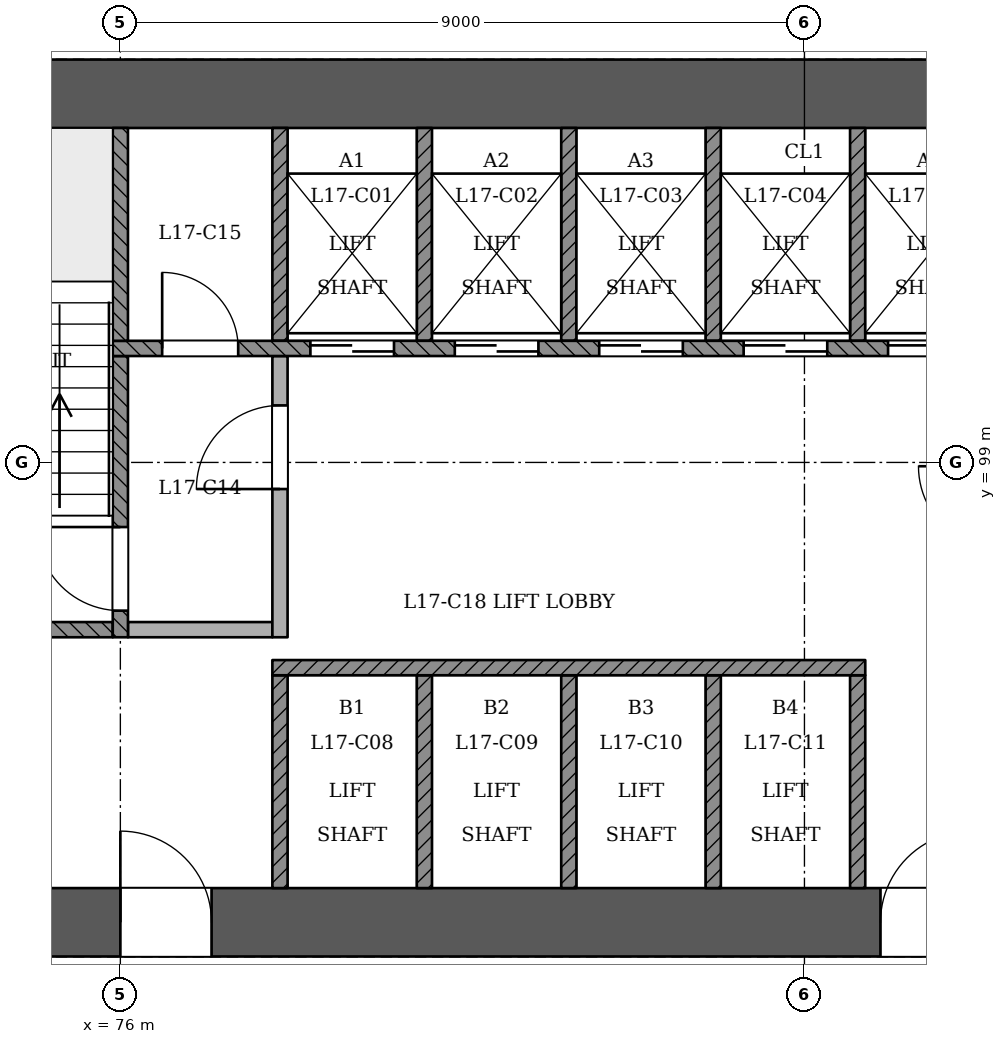
"""IFC4 building model, lengths in metres.
Left out: names, types, materials, properties, quantities, classifications, styles, units other than length and angle.
Written with IfcOpenShell. Run it as: python <this file> out.ifc"""

import sys

from ifc_helpers import new_model, si_unit, direction, frame, frame_2d, origin, place, context, subcontext, project, spatial, rectangle, extrude, element, fill, save


model = new_model("IFC4")
c1 = context("Model", 3, precision=1e-05, world=origin(), true_north=direction((0.0, 1.0)))
c2 = subcontext(c1, "Body", "Model", "MODEL_VIEW")
j1 = project(units=[si_unit("LENGTHUNIT", "METRE"), si_unit("PLANEANGLEUNIT", "RADIAN")], contexts=[c1])
p1 = place(None, origin())
s1 = spatial("IfcSite", under=j1, at=p1, CompositionType="ELEMENT")
p2 = place(p1, origin())
s2 = spatial("IfcBuilding", under=s1, at=p2, CompositionType="ELEMENT")
p3 = place(p2, frame((0.0, 0.0, 70.2)))
s3 = spatial("IfcBuildingStorey", under=s2, at=p3, CompositionType="ELEMENT", Elevation=70.2)
p4 = place(p3, frame((72.55, 92.95, 0.0), z_axis=(0.0, 0.0, 1.0), x_axis=(1.0, 0.0, 0.0)))
e1 = element("IfcWall", 1, at=p4, inside=s3, PredefinedType="SHEAR", context=c2, shape_type="SweptSolid", body=[
    extrude(rectangle(XDim=25.35, YDim=0.9, at=frame_2d((12.675, 0.0))), origin(), (0.0, 0.0, 1.0), 3.6),
])
p5 = place(p4, frame((1.25, 0.0, 0.0)))
e2 = element("IfcOpeningElement", 2, at=p5, cuts=e1, PredefinedType="OPENING", context=c2, shape_type="SweptSolid", body=[
    extrude(rectangle(XDim=1.2, YDim=2.1, at=frame_2d((0.6, 1.05))), frame((0.0, 0.46, 0.0), z_axis=(0.0, -1.0, 0.0), x_axis=(1.0, 0.0, 0.0)), (0.0, 0.0, 1.0), 0.921),
])
p6 = place(p4, frame((3.45, 0.0, 0.0)))
e3 = element("IfcOpeningElement", 3, at=p6, cuts=e1, PredefinedType="OPENING", context=c2, shape_type="SweptSolid", body=[
    extrude(rectangle(XDim=1.2, YDim=2.1, at=frame_2d((0.6, 1.05))), frame((0.0, 0.46, 0.0), z_axis=(0.0, -1.0, 0.0), x_axis=(1.0, 0.0, 0.0)), (0.0, 0.0, 1.0), 0.921),
])
p7 = place(p4, frame((13.45, 0.0, 0.0)))
e4 = element("IfcOpeningElement", 4, at=p7, cuts=e1, PredefinedType="OPENING", context=c2, shape_type="SweptSolid", body=[
    extrude(rectangle(XDim=1.2, YDim=2.1, at=frame_2d((0.6, 1.05))), frame((0.0, 0.46, 0.0), z_axis=(0.0, -1.0, 0.0), x_axis=(1.0, 0.0, 0.0)), (0.0, 0.0, 1.0), 0.921),
])
p8 = place(p4, frame((16.312, 0.0, 0.0)))
e5 = element("IfcOpeningElement", 5, at=p8, cuts=e1, PredefinedType="OPENING", context=c2, shape_type="SweptSolid", body=[
    extrude(rectangle(XDim=1.0, YDim=2.1, at=frame_2d((0.5, 1.05))), frame((0.0, 0.46, 0.0), z_axis=(0.0, -1.0, 0.0), x_axis=(1.0, 0.0, 0.0)), (0.0, 0.0, 1.0), 0.921),
])
p9 = place(p4, frame((19.75, 0.0, 0.0)))
e6 = element("IfcOpeningElement", 6, at=p9, cuts=e1, PredefinedType="OPENING", context=c2, shape_type="SweptSolid", body=[
    extrude(rectangle(XDim=1.0, YDim=2.1, at=frame_2d((0.5, 1.05))), frame((0.0, 0.46, 0.0), z_axis=(0.0, -1.0, 0.0), x_axis=(1.0, 0.0, 0.0)), (0.0, 0.0, 1.0), 0.921),
])
p10 = place(p4, frame((22.738, 0.0, 0.0)))
e7 = element("IfcOpeningElement", 7, at=p10, cuts=e1, PredefinedType="OPENING", context=c2, shape_type="SweptSolid", body=[
    extrude(rectangle(XDim=1.0, YDim=2.1, at=frame_2d((0.5, 1.05))), frame((0.0, 0.46, 0.0), z_axis=(0.0, -1.0, 0.0), x_axis=(1.0, 0.0, 0.0)), (0.0, 0.0, 1.0), 0.921),
])
p11 = place(p3, frame((97.45, 103.85, 0.0), z_axis=(0.0, 0.0, 1.0), x_axis=(-1.0, 0.0, 0.0)))
e8 = element("IfcWall", 8, at=p11, inside=s3, PredefinedType="SHEAR", context=c2, shape_type="SweptSolid", body=[
    extrude(rectangle(XDim=25.35, YDim=0.9, at=frame_2d((12.675, 0.0))), origin(), (0.0, 0.0, 1.0), 3.6),
])
p12 = place(p3, frame((62.59, 97.14, 0.0), z_axis=(0.0, 0.0, 1.0), x_axis=(0.500002288388, -0.866024082579, 0.0)))
e9 = element("IfcWall", 9, at=p12, inside=s3, PredefinedType="PARTITIONING", context=c2, shape_type="SweptSolid", body=[
    extrude(rectangle(XDim=43.248, YDim=0.15, at=frame_2d((21.624, 0.0))), origin(), (0.0, 0.0, 1.0), 2.7),
])
p13 = place(p12, frame((1.28, 0.0, 0.0)))
e10 = element("IfcOpeningElement", 10, at=p13, cuts=e9, PredefinedType="OPENING", context=c2, shape_type="SweptSolid", body=[
    extrude(rectangle(XDim=1.0, YDim=2.1, at=frame_2d((0.5, 1.05))), frame((0.0, 0.085, 0.0), z_axis=(0.0, -1.0, 0.0), x_axis=(1.0, 0.0, 0.0)), (0.0, 0.0, 1.0), 0.171),
])
p14 = place(p12, frame((4.195, 0.0, 0.0)))
e11 = element("IfcOpeningElement", 11, at=p14, cuts=e9, PredefinedType="OPENING", context=c2, shape_type="SweptSolid", body=[
    extrude(rectangle(XDim=1.1, YDim=2.1, at=frame_2d((0.55, 1.05))), frame((0.0, 0.085, 0.0), z_axis=(0.0, -1.0, 0.0), x_axis=(1.0, 0.0, 0.0)), (0.0, 0.0, 1.0), 0.171),
])
p15 = place(p12, frame((10.904, 0.0, 0.0)))
e12 = element("IfcOpeningElement", 12, at=p15, cuts=e9, PredefinedType="OPENING", context=c2, shape_type="SweptSolid", body=[
    extrude(rectangle(XDim=1.0, YDim=2.1, at=frame_2d((0.5, 1.05))), frame((0.0, 0.085, 0.0), z_axis=(0.0, -1.0, 0.0), x_axis=(1.0, 0.0, 0.0)), (0.0, 0.0, 1.0), 0.171),
])
p16 = place(p12, frame((17.624, 0.0, 0.0)))
e13 = element("IfcOpeningElement", 13, at=p16, cuts=e9, PredefinedType="OPENING", context=c2, shape_type="SweptSolid", body=[
    extrude(rectangle(XDim=1.2, YDim=2.1, at=frame_2d((0.6, 1.05))), frame((0.0, 0.085, 0.0), z_axis=(0.0, -1.0, 0.0), x_axis=(1.0, 0.0, 0.0)), (0.0, 0.0, 1.0), 0.171),
])
p17 = place(p12, frame((22.229, 0.0, 0.0)))
e14 = element("IfcOpeningElement", 14, at=p17, cuts=e9, PredefinedType="OPENING", context=c2, shape_type="SweptSolid", body=[
    extrude(rectangle(XDim=1.0, YDim=2.1, at=frame_2d((0.5, 1.05))), frame((0.0, 0.085, 0.0), z_axis=(0.0, -1.0, 0.0), x_axis=(1.0, 0.0, 0.0)), (0.0, 0.0, 1.0), 0.171),
])
p18 = place(p12, frame((28.904, 0.0, 0.0)))
e15 = element("IfcOpeningElement", 15, at=p18, cuts=e9, PredefinedType="OPENING", context=c2, shape_type="SweptSolid", body=[
    extrude(rectangle(XDim=1.0, YDim=2.1, at=frame_2d((0.5, 1.05))), frame((0.0, 0.085, 0.0), z_axis=(0.0, -1.0, 0.0), x_axis=(1.0, 0.0, 0.0)), (0.0, 0.0, 1.0), 0.171),
])
p19 = place(p12, frame((32.374, 0.0, 0.0)))
e16 = element("IfcOpeningElement", 16, at=p19, cuts=e9, PredefinedType="OPENING", context=c2, shape_type="SweptSolid", body=[
    extrude(rectangle(XDim=1.0, YDim=2.1, at=frame_2d((0.5, 1.05))), frame((0.0, 0.085, 0.0), z_axis=(0.0, -1.0, 0.0), x_axis=(1.0, 0.0, 0.0)), (0.0, 0.0, 1.0), 0.171),
])
p20 = place(p12, frame((38.618, 0.0, 0.0)))
e17 = element("IfcOpeningElement", 17, at=p20, cuts=e9, PredefinedType="OPENING", context=c2, shape_type="SweptSolid", body=[
    extrude(rectangle(XDim=1.2, YDim=2.1, at=frame_2d((0.6, 1.05))), frame((0.0, 0.085, 0.0), z_axis=(0.0, -1.0, 0.0), x_axis=(1.0, 0.0, 0.0)), (0.0, 0.0, 1.0), 0.171),
])
p21 = place(p3, frame((85.785, 59.686, 0.0), z_axis=(0.0, 0.0, 1.0), x_axis=(0.500002288388, 0.866024082579, 0.0)))
e18 = element("IfcWall", 18, at=p21, inside=s3, PredefinedType="PARTITIONING", context=c2, shape_type="SweptSolid", body=[
    extrude(rectangle(XDim=43.248, YDim=0.15, at=frame_2d((21.624, 0.0))), origin(), (0.0, 0.0, 1.0), 2.7),
])
p22 = place(p21, frame((0.256, 0.0, 0.0)))
e19 = element("IfcOpeningElement", 19, at=p22, cuts=e18, PredefinedType="OPENING", context=c2, shape_type="SweptSolid", body=[
    extrude(rectangle(XDim=1.2, YDim=2.1, at=frame_2d((0.6, 1.05))), frame((0.0, 0.085, 0.0), z_axis=(0.0, -1.0, 0.0), x_axis=(1.0, 0.0, 0.0)), (0.0, 0.0, 1.0), 0.171),
])
p23 = place(p21, frame((4.229, 0.0, 0.0)))
e20 = element("IfcOpeningElement", 20, at=p23, cuts=e18, PredefinedType="OPENING", context=c2, shape_type="SweptSolid", body=[
    extrude(rectangle(XDim=1.0, YDim=2.1, at=frame_2d((0.5, 1.05))), frame((0.0, 0.085, 0.0), z_axis=(0.0, -1.0, 0.0), x_axis=(1.0, 0.0, 0.0)), (0.0, 0.0, 1.0), 0.171),
])
p24 = place(p21, frame((10.904, 0.0, 0.0)))
e21 = element("IfcOpeningElement", 21, at=p24, cuts=e18, PredefinedType="OPENING", context=c2, shape_type="SweptSolid", body=[
    extrude(rectangle(XDim=1.0, YDim=2.1, at=frame_2d((0.5, 1.05))), frame((0.0, 0.085, 0.0), z_axis=(0.0, -1.0, 0.0), x_axis=(1.0, 0.0, 0.0)), (0.0, 0.0, 1.0), 0.171),
])
p25 = place(p21, frame((13.345, 0.0, 0.0)))
e22 = element("IfcOpeningElement", 22, at=p25, cuts=e18, PredefinedType="OPENING", context=c2, shape_type="SweptSolid", body=[
    extrude(rectangle(XDim=1.0, YDim=2.1, at=frame_2d((0.5, 1.05))), frame((0.0, 0.085, 0.0), z_axis=(0.0, -1.0, 0.0), x_axis=(1.0, 0.0, 0.0)), (0.0, 0.0, 1.0), 0.171),
])
p26 = place(p21, frame((21.024, 0.0, 0.0)))
e23 = element("IfcOpeningElement", 23, at=p26, cuts=e18, PredefinedType="OPENING", context=c2, shape_type="SweptSolid", body=[
    extrude(rectangle(XDim=1.2, YDim=2.1, at=frame_2d((0.6, 1.05))), frame((0.0, 0.085, 0.0), z_axis=(0.0, -1.0, 0.0), x_axis=(1.0, 0.0, 0.0)), (0.0, 0.0, 1.0), 0.171),
])
p27 = place(p21, frame((28.904, 0.0, 0.0)))
e24 = element("IfcOpeningElement", 24, at=p27, cuts=e18, PredefinedType="OPENING", context=c2, shape_type="SweptSolid", body=[
    extrude(rectangle(XDim=1.0, YDim=2.1, at=frame_2d((0.5, 1.05))), frame((0.0, 0.085, 0.0), z_axis=(0.0, -1.0, 0.0), x_axis=(1.0, 0.0, 0.0)), (0.0, 0.0, 1.0), 0.171),
])
p28 = place(p21, frame((31.195, 0.0, 0.0)))
e25 = element("IfcOpeningElement", 25, at=p28, cuts=e18, PredefinedType="OPENING", context=c2, shape_type="SweptSolid", body=[
    extrude(rectangle(XDim=1.1, YDim=2.1, at=frame_2d((0.55, 1.05))), frame((0.0, 0.085, 0.0), z_axis=(0.0, -1.0, 0.0), x_axis=(1.0, 0.0, 0.0)), (0.0, 0.0, 1.0), 0.171),
])
p29 = place(p21, frame((38.618, 0.0, 0.0)))
e26 = element("IfcOpeningElement", 26, at=p29, cuts=e18, PredefinedType="OPENING", context=c2, shape_type="SweptSolid", body=[
    extrude(rectangle(XDim=1.2, YDim=2.1, at=frame_2d((0.6, 1.05))), frame((0.0, 0.085, 0.0), z_axis=(0.0, -1.0, 0.0), x_axis=(1.0, 0.0, 0.0)), (0.0, 0.0, 1.0), 0.171),
])
for number, where, z_axis, x_axis in (
    (27, (78.1, 93.4, 0.0), (0.0, 0.0, 1.0), (0.0, 1.0, 0.0)),
    (28, (80.0, 93.4, 0.0), (0.0, 0.0, 1.0), (0.0, 1.0, 0.0)),
    (29, (81.9, 93.4, 0.0), (0.0, 0.0, 1.0), (0.0, 1.0, 0.0)),
    (30, (83.8, 93.4, 0.0), (0.0, 0.0, 1.0), (0.0, 1.0, 0.0)),
    (31, (85.7, 93.4, 0.0), (0.0, 0.0, 1.0), (0.0, 1.0, 0.0)),
):
    element("IfcWall", number, at=place(p3, frame(where, z_axis=z_axis, x_axis=x_axis)), inside=s3, PredefinedType="SOLIDWALL", context=c2, shape_type="SweptSolid", body=[
        extrude(rectangle(XDim=2.8, YDim=0.2, at=frame_2d((1.4, 0.0))), origin(), (0.0, 0.0, 1.0), 3.1),
    ])
p30 = place(p3, frame((78.0, 96.3, 0.0), z_axis=(0.0, 0.0, 1.0), x_axis=(1.0, 0.0, 0.0)))
e32 = element("IfcWall", 32, at=p30, inside=s3, PredefinedType="SOLIDWALL", context=c2, shape_type="SweptSolid", body=[
    extrude(rectangle(XDim=7.8, YDim=0.2, at=frame_2d((3.9, 0.0))), origin(), (0.0, 0.0, 1.0), 3.1),
])
p31 = place(p3, frame((73.0, 96.8, 0.0), z_axis=(0.0, 0.0, 1.0), x_axis=(1.0, 0.0, 0.0)))
e33 = element("IfcWall", 33, at=p31, inside=s3, PredefinedType="SOLIDWALL", context=c2, shape_type="SweptSolid", body=[
    extrude(rectangle(XDim=2.9, YDim=0.2, at=frame_2d((1.45, 0.0))), origin(), (0.0, 0.0, 1.0), 3.1),
])
p32 = place(p3, frame((76.0, 96.7, 0.0), z_axis=(0.0, 0.0, 1.0), x_axis=(0.0, 1.0, 0.0)))
e34 = element("IfcWall", 34, at=p32, inside=s3, PredefinedType="SOLIDWALL", context=c2, shape_type="SweptSolid", body=[
    extrude(rectangle(XDim=3.7, YDim=0.2, at=frame_2d((1.85, 0.0))), origin(), (0.0, 0.0, 1.0), 3.1),
])
p33 = place(p32, frame((0.35, 0.0, 0.0)))
e35 = element("IfcOpeningElement", 35, at=p33, cuts=e34, PredefinedType="OPENING", context=c2, shape_type="SweptSolid", body=[
    extrude(rectangle(XDim=1.1, YDim=2.1, at=frame_2d((0.55, 1.05))), frame((0.0, 0.11, 0.0), z_axis=(0.0, -1.0, 0.0), x_axis=(1.0, 0.0, 0.0)), (0.0, 0.0, 1.0), 0.221),
])
p34 = place(p3, frame((76.1, 96.8, 0.0), z_axis=(0.0, 0.0, 1.0), x_axis=(1.0, 0.0, 0.0)))
e36 = element("IfcWall", 36, at=p34, inside=s3, PredefinedType="PARTITIONING", context=c2, shape_type="SweptSolid", body=[
    extrude(rectangle(XDim=1.9, YDim=0.2, at=frame_2d((0.95, 0.0))), origin(), (0.0, 0.0, 1.0), 3.1),
])
p35 = place(p3, frame((78.1, 96.7, 0.0), z_axis=(0.0, 0.0, 1.0), x_axis=(0.0, 1.0, 0.0)))
e37 = element("IfcWall", 37, at=p35, inside=s3, PredefinedType="PARTITIONING", context=c2, shape_type="SweptSolid", body=[
    extrude(rectangle(XDim=3.7, YDim=0.2, at=frame_2d((1.85, 0.0))), origin(), (0.0, 0.0, 1.0), 3.1),
])
p36 = place(p35, frame((1.95, 0.0, 0.0)))
e38 = element("IfcOpeningElement", 38, at=p36, cuts=e37, PredefinedType="OPENING", context=c2, shape_type="SweptSolid", body=[
    extrude(rectangle(XDim=1.1, YDim=2.1, at=frame_2d((0.55, 1.05))), frame((0.0, 0.11, 0.0), z_axis=(0.0, -1.0, 0.0), x_axis=(1.0, 0.0, 0.0)), (0.0, 0.0, 1.0), 0.221),
])
p37 = place(p3, frame((75.9, 100.5, 0.0), z_axis=(0.0, 0.0, 1.0), x_axis=(1.0, 0.0, 0.0)))
e39 = element("IfcWall", 39, at=p37, inside=s3, PredefinedType="SOLIDWALL", context=c2, shape_type="SweptSolid", body=[
    extrude(rectangle(XDim=18.2, YDim=0.2, at=frame_2d((9.1, 0.0))), origin(), (0.0, 0.0, 1.0), 3.1),
])
p38 = place(p37, frame((2.6, 0.0, 0.0)))
e40 = element("IfcOpeningElement", 40, at=p38, cuts=e39, PredefinedType="OPENING", context=c2, shape_type="SweptSolid", body=[
    extrude(rectangle(XDim=1.1, YDim=2.1, at=frame_2d((0.55, 1.05))), frame((0.0, 0.11, 0.0), z_axis=(0.0, -1.0, 0.0), x_axis=(1.0, 0.0, 0.0)), (0.0, 0.0, 1.0), 0.221),
])
p39 = place(p37, frame((4.5, 0.0, 0.0)))
e41 = element("IfcOpeningElement", 41, at=p39, cuts=e39, PredefinedType="OPENING", context=c2, shape_type="SweptSolid", body=[
    extrude(rectangle(XDim=1.1, YDim=2.1, at=frame_2d((0.55, 1.05))), frame((0.0, 0.11, 0.0), z_axis=(0.0, -1.0, 0.0), x_axis=(1.0, 0.0, 0.0)), (0.0, 0.0, 1.0), 0.221),
])
p40 = place(p37, frame((6.4, 0.0, 0.0)))
e42 = element("IfcOpeningElement", 42, at=p40, cuts=e39, PredefinedType="OPENING", context=c2, shape_type="SweptSolid", body=[
    extrude(rectangle(XDim=1.1, YDim=2.1, at=frame_2d((0.55, 1.05))), frame((0.0, 0.11, 0.0), z_axis=(0.0, -1.0, 0.0), x_axis=(1.0, 0.0, 0.0)), (0.0, 0.0, 1.0), 0.221),
])
p41 = place(p37, frame((8.3, 0.0, 0.0)))
e43 = element("IfcOpeningElement", 43, at=p41, cuts=e39, PredefinedType="OPENING", context=c2, shape_type="SweptSolid", body=[
    extrude(rectangle(XDim=1.1, YDim=2.1, at=frame_2d((0.55, 1.05))), frame((0.0, 0.11, 0.0), z_axis=(0.0, -1.0, 0.0), x_axis=(1.0, 0.0, 0.0)), (0.0, 0.0, 1.0), 0.221),
])
p42 = place(p37, frame((10.2, 0.0, 0.0)))
e44 = element("IfcOpeningElement", 44, at=p42, cuts=e39, PredefinedType="OPENING", context=c2, shape_type="SweptSolid", body=[
    extrude(rectangle(XDim=1.1, YDim=2.1, at=frame_2d((0.55, 1.05))), frame((0.0, 0.11, 0.0), z_axis=(0.0, -1.0, 0.0), x_axis=(1.0, 0.0, 0.0)), (0.0, 0.0, 1.0), 0.221),
])
p43 = place(p37, frame((12.1, 0.0, 0.0)))
e45 = element("IfcOpeningElement", 45, at=p43, cuts=e39, PredefinedType="OPENING", context=c2, shape_type="SweptSolid", body=[
    extrude(rectangle(XDim=1.1, YDim=2.1, at=frame_2d((0.55, 1.05))), frame((0.0, 0.11, 0.0), z_axis=(0.0, -1.0, 0.0), x_axis=(1.0, 0.0, 0.0)), (0.0, 0.0, 1.0), 0.221),
])
p44 = place(p37, frame((14.0, 0.0, 0.0)))
e46 = element("IfcOpeningElement", 46, at=p44, cuts=e39, PredefinedType="OPENING", context=c2, shape_type="SweptSolid", body=[
    extrude(rectangle(XDim=1.1, YDim=2.1, at=frame_2d((0.55, 1.05))), frame((0.0, 0.11, 0.0), z_axis=(0.0, -1.0, 0.0), x_axis=(1.0, 0.0, 0.0)), (0.0, 0.0, 1.0), 0.221),
])
p45 = place(p37, frame((0.65, 0.0, 0.0)))
e47 = element("IfcOpeningElement", 47, at=p45, cuts=e39, PredefinedType="OPENING", context=c2, shape_type="SweptSolid", body=[
    extrude(rectangle(XDim=1.0, YDim=2.1, at=frame_2d((0.5, 1.05))), frame((0.0, 0.11, 0.0), z_axis=(0.0, -1.0, 0.0), x_axis=(1.0, 0.0, 0.0)), (0.0, 0.0, 1.0), 0.221),
])
p46 = place(p37, frame((16.3, 0.0, 0.0)))
e48 = element("IfcOpeningElement", 48, at=p46, cuts=e39, PredefinedType="OPENING", context=c2, shape_type="SweptSolid", body=[
    extrude(rectangle(XDim=1.0, YDim=2.1, at=frame_2d((0.5, 1.05))), frame((0.0, 0.11, 0.0), z_axis=(0.0, -1.0, 0.0), x_axis=(1.0, 0.0, 0.0)), (0.0, 0.0, 1.0), 0.221),
])
for number, where, z_axis, x_axis in (
    (49, (76.0, 100.6, 0.0), (0.0, 0.0, 1.0), (0.0, 1.0, 0.0)),
    (50, (78.1, 100.6, 0.0), (0.0, 0.0, 1.0), (0.0, 1.0, 0.0)),
    (51, (80.0, 100.6, 0.0), (0.0, 0.0, 1.0), (0.0, 1.0, 0.0)),
    (52, (81.9, 100.6, 0.0), (0.0, 0.0, 1.0), (0.0, 1.0, 0.0)),
    (53, (83.8, 100.6, 0.0), (0.0, 0.0, 1.0), (0.0, 1.0, 0.0)),
    (54, (85.7, 100.6, 0.0), (0.0, 0.0, 1.0), (0.0, 1.0, 0.0)),
):
    element("IfcWall", number, at=place(p3, frame(where, z_axis=z_axis, x_axis=x_axis)), inside=s3, PredefinedType="SOLIDWALL", context=c2, shape_type="SweptSolid", body=[
        extrude(rectangle(XDim=2.8, YDim=0.2, at=frame_2d((1.4, 0.0))), origin(), (0.0, 0.0, 1.0), 3.1),
    ])
p47 = place(p38, origin())
e55 = element("IfcDoor", 55, at=p47, inside=s3, OperationType="SLIDING_TO_RIGHT", PredefinedType="NOTDEFINED", context=c2, shape_type="SweptSolid", body=[
    extrude(rectangle(XDim=1.1, YDim=2.1, at=frame_2d((0.55, 1.05))), frame((0.0, 0.025, 0.0), z_axis=(0.0, -1.0, 0.0), x_axis=(1.0, 0.0, 0.0)), (0.0, 0.0, 1.0), 0.05),
])
fill(e40, e55)
p48 = place(p39, origin())
e56 = element("IfcDoor", 56, at=p48, inside=s3, OperationType="SLIDING_TO_LEFT", PredefinedType="NOTDEFINED", context=c2, shape_type="SweptSolid", body=[
    extrude(rectangle(XDim=1.1, YDim=2.1, at=frame_2d((0.55, 1.05))), frame((0.0, 0.025, 0.0), z_axis=(0.0, -1.0, 0.0), x_axis=(1.0, 0.0, 0.0)), (0.0, 0.0, 1.0), 0.05),
])
fill(e41, e56)
p49 = place(p40, origin())
e57 = element("IfcDoor", 57, at=p49, inside=s3, OperationType="SLIDING_TO_RIGHT", PredefinedType="NOTDEFINED", context=c2, shape_type="SweptSolid", body=[
    extrude(rectangle(XDim=1.1, YDim=2.1, at=frame_2d((0.55, 1.05))), frame((0.0, 0.025, 0.0), z_axis=(0.0, -1.0, 0.0), x_axis=(1.0, 0.0, 0.0)), (0.0, 0.0, 1.0), 0.05),
])
fill(e42, e57)
p50 = place(p41, origin())
e58 = element("IfcDoor", 58, at=p50, inside=s3, OperationType="SLIDING_TO_LEFT", PredefinedType="NOTDEFINED", context=c2, shape_type="SweptSolid", body=[
    extrude(rectangle(XDim=1.1, YDim=2.1, at=frame_2d((0.55, 1.05))), frame((0.0, 0.025, 0.0), z_axis=(0.0, -1.0, 0.0), x_axis=(1.0, 0.0, 0.0)), (0.0, 0.0, 1.0), 0.05),
])
fill(e43, e58)
p51 = place(p42, origin())
e59 = element("IfcDoor", 59, at=p51, inside=s3, OperationType="SLIDING_TO_RIGHT", PredefinedType="NOTDEFINED", context=c2, shape_type="SweptSolid", body=[
    extrude(rectangle(XDim=1.1, YDim=2.1, at=frame_2d((0.55, 1.05))), frame((0.0, 0.025, 0.0), z_axis=(0.0, -1.0, 0.0), x_axis=(1.0, 0.0, 0.0)), (0.0, 0.0, 1.0), 0.05),
])
fill(e44, e59)
p52 = place(p33, origin())
e60 = element("IfcDoor", 60, at=p52, inside=s3, OperationType="SINGLE_SWING_RIGHT", PredefinedType="NOTDEFINED", context=c2, shape_type="SweptSolid", body=[
    extrude(rectangle(XDim=1.1, YDim=2.1, at=frame_2d((0.55, 1.05))), frame((0.0, 0.025, 0.0), z_axis=(0.0, -1.0, 0.0), x_axis=(1.0, 0.0, 0.0)), (0.0, 0.0, 1.0), 0.05),
])
fill(e35, e60)
p53 = place(p36, origin())
e61 = element("IfcDoor", 61, at=p53, inside=s3, OperationType="SINGLE_SWING_LEFT", PredefinedType="NOTDEFINED", context=c2, shape_type="SweptSolid", body=[
    extrude(rectangle(XDim=1.1, YDim=2.1, at=frame_2d((0.55, 1.05))), frame((0.0, 0.025, 0.0), z_axis=(0.0, -1.0, 0.0), x_axis=(1.0, 0.0, 0.0)), (0.0, 0.0, 1.0), 0.05),
])
fill(e38, e61)
p54 = place(p6, origin())
e62 = element("IfcDoor", 62, at=p54, inside=s3, OperationType="SINGLE_SWING_LEFT", PredefinedType="NOTDEFINED", context=c2, shape_type="SweptSolid", body=[
    extrude(rectangle(XDim=1.2, YDim=2.1, at=frame_2d((0.6, 1.05))), frame((0.0, 0.025, 0.0), z_axis=(0.0, -1.0, 0.0), x_axis=(1.0, 0.0, 0.0)), (0.0, 0.0, 1.0), 0.05),
])
fill(e3, e62)
p55 = place(p7, origin())
e63 = element("IfcDoor", 63, at=p55, inside=s3, OperationType="SINGLE_SWING_RIGHT", PredefinedType="NOTDEFINED", context=c2, shape_type="SweptSolid", body=[
    extrude(rectangle(XDim=1.2, YDim=2.1, at=frame_2d((0.6, 1.05))), frame((0.0, 0.025, 0.0), z_axis=(0.0, -1.0, 0.0), x_axis=(1.0, 0.0, 0.0)), (0.0, 0.0, 1.0), 0.05),
])
fill(e4, e63)
p56 = place(p45, origin())
e64 = element("IfcDoor", 64, at=p56, inside=s3, OperationType="SINGLE_SWING_LEFT", PredefinedType="NOTDEFINED", context=c2, shape_type="SweptSolid", body=[
    extrude(rectangle(XDim=1.0, YDim=2.1, at=frame_2d((0.5, 1.05))), frame((0.0, 0.025, 0.0), z_axis=(0.0, -1.0, 0.0), x_axis=(1.0, 0.0, 0.0)), (0.0, 0.0, 1.0), 0.05),
])
fill(e47, e64)
save(model, sys.argv[1])
